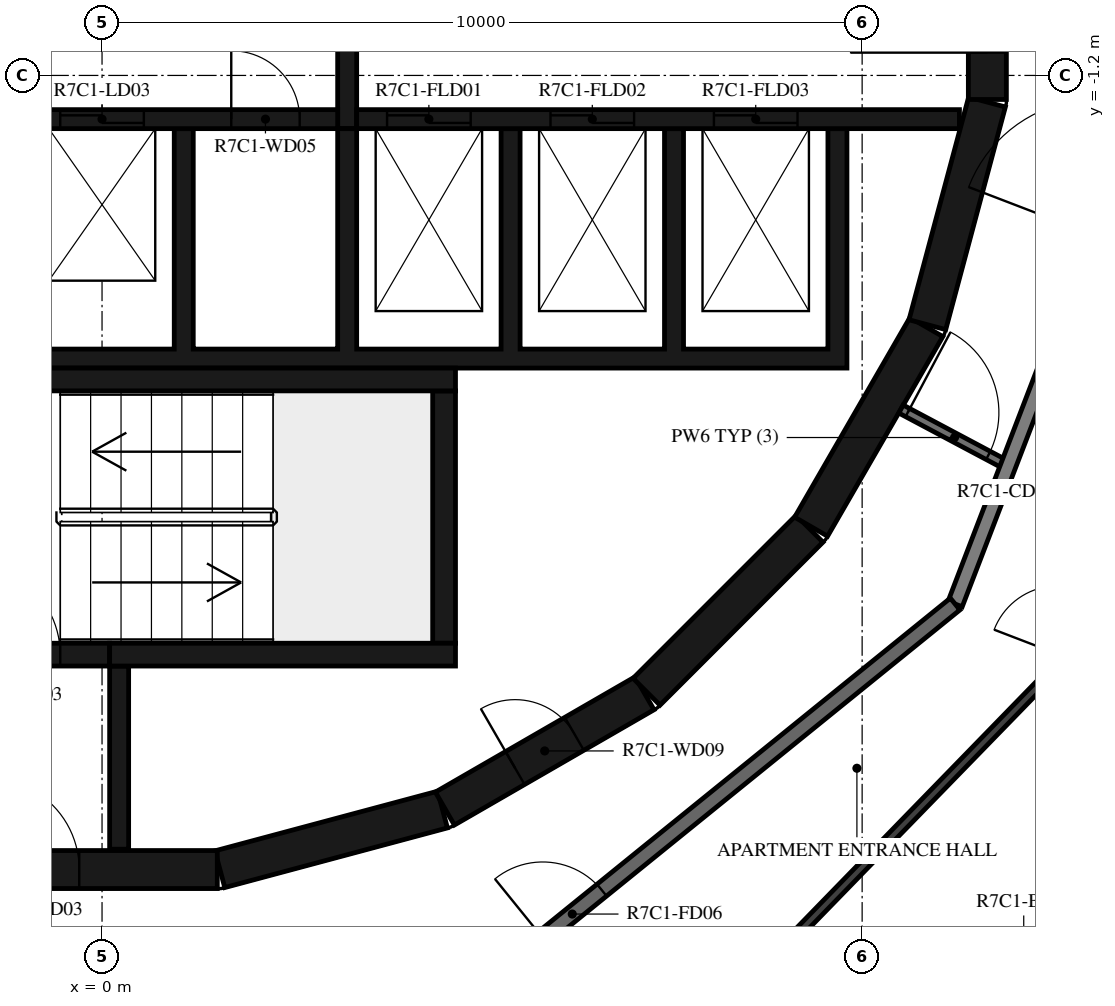
"""IFC4 building model, lengths in metres.
Left out: names, types, materials, properties, quantities, classifications, styles, units other than length and angle.
Written with IfcOpenShell. Run it as: python <this file> out.ifc"""

import sys

from ifc_helpers import new_model, si_unit, direction, frame, frame_2d, origin, place, context, subcontext, project, spatial, polyline, rectangle, outline, extrude, element, fill, save


model = new_model("IFC4")
c1 = context("Model", 3, precision=1e-05, world=origin(), true_north=direction((0.0, 1.0)))
c2 = subcontext(c1, "Body", "Model", "MODEL_VIEW")
j1 = project(units=[si_unit("LENGTHUNIT", "METRE"), si_unit("PLANEANGLEUNIT", "RADIAN")], contexts=[c1])
p1 = place(None, origin())
s1 = spatial("IfcSite", under=j1, at=p1, CompositionType="ELEMENT")
p2 = place(p1, origin())
s2 = spatial("IfcBuilding", under=s1, at=p2, CompositionType="ELEMENT")
p3 = place(p2, frame((0.0, 0.0, 287.9)))
s3 = spatial("IfcBuildingStorey", under=s2, at=p3, CompositionType="ELEMENT", Elevation=287.9)
p4 = place(p3, frame((1.55, -11.643, 0.0), z_axis=(0.0, 0.0, 1.0), x_axis=(0.965948410781, 0.258734743916, 0.0)))
e1 = element("IfcWall", 1, at=p4, inside=s3, PredefinedType="SHEAR", context=c2, shape_type="SweptSolid", body=[
    extrude(rectangle(XDim=3.033, YDim=0.5, at=frame_2d((1.516, 0.0))), origin(), (0.0, 0.0, 1.0), 3.05),
])
p5 = place(p3, frame((4.51, -10.845, 0.0), z_axis=(0.0, 0.0, 1.0), x_axis=(0.865975092491, 0.500087131594, 0.0)))
e2 = element("IfcWall", 2, at=p5, inside=s3, PredefinedType="SHEAR", context=c2, shape_type="SweptSolid", body=[
    extrude(rectangle(XDim=3.033, YDim=0.5, at=frame_2d((1.516, 0.0))), origin(), (0.0, 0.0, 1.0), 3.05),
])
p6 = place(p5, frame((1.066, 0.0, 0.0)))
e3 = element("IfcOpeningElement", 3, at=p6, cuts=e2, PredefinedType="OPENING", context=c2, shape_type="SweptSolid", body=[
    extrude(rectangle(XDim=0.9, YDim=2.1, at=frame_2d((0.45, 1.05))), frame((0.0, 0.26, 0.0), z_axis=(0.0, -1.0, 0.0), x_axis=(1.0, 0.0, 0.0)), (0.0, 0.0, 1.0), 0.52),
])
p7 = place(p3, frame((7.164, -9.308, 0.0), z_axis=(0.0, 0.0, 1.0), x_axis=(0.707106781187, 0.707106781187, 0.0)))
e4 = element("IfcWall", 4, at=p7, inside=s3, PredefinedType="SHEAR", context=c2, shape_type="SweptSolid", body=[
    extrude(rectangle(XDim=3.032, YDim=0.5, at=frame_2d((1.516, 0.0))), origin(), (0.0, 0.0, 1.0), 3.05),
])
for number, where, z_axis, x_axis in (
    (5, (9.329, -7.137, 0.0), (0.0, 0.0, 1.0), (0.5, 0.866, 0.0)),
    (6, (10.858, -4.479, 0.0), (0.0, 0.0, 1.0), (0.259, 0.966, 0.0)),
):
    element("IfcWall", number, at=place(p3, frame(where, z_axis=z_axis, x_axis=x_axis)), inside=s3, PredefinedType="SHEAR", context=c2, shape_type="SweptSolid", body=[
        extrude(rectangle(XDim=3.033, YDim=0.5, at=frame_2d((1.516, 0.0))), origin(), (0.0, 0.0, 1.0), 3.05),
    ])
p8 = place(p3, frame((11.647, -1.516, 0.0), z_axis=(0.0, 0.0, 1.0), x_axis=(0.0, 1.0, 0.0)))
e7 = element("IfcWall", 7, at=p8, inside=s3, PredefinedType="SHEAR", context=c2, shape_type="SweptSolid", body=[
    extrude(rectangle(XDim=3.033, YDim=0.5, at=frame_2d((1.516, 0.0))), origin(), (0.0, 0.0, 1.0), 3.05),
])
p9 = place(p8, frame((0.616, 0.0, 0.0)))
e8 = element("IfcOpeningElement", 8, at=p9, cuts=e7, PredefinedType="OPENING", context=c2, shape_type="SweptSolid", body=[
    extrude(rectangle(XDim=1.8, YDim=2.1, at=frame_2d((0.9, 1.05))), frame((0.0, 0.26, 0.0), z_axis=(0.0, -1.0, 0.0), x_axis=(1.0, 0.0, 0.0)), (0.0, 0.0, 1.0), 0.52),
])
p10 = place(p3, frame((-1.516, -11.647, 0.0), z_axis=(0.0, 0.0, 1.0), x_axis=(1.0, 0.0, 0.0)))
e9 = element("IfcWall", 9, at=p10, inside=s3, PredefinedType="SHEAR", context=c2, shape_type="SweptSolid", body=[
    extrude(rectangle(XDim=3.033, YDim=0.5, at=frame_2d((1.516, 0.0))), origin(), (0.0, 0.0, 1.0), 3.05),
])
p11 = place(p10, frame((0.016, 0.0, 0.0)))
e10 = element("IfcOpeningElement", 10, at=p11, cuts=e9, PredefinedType="OPENING", context=c2, shape_type="SweptSolid", body=[
    extrude(rectangle(XDim=1.2, YDim=2.1, at=frame_2d((0.6, 1.05))), frame((0.0, 0.26, 0.0), z_axis=(0.0, -1.0, 0.0), x_axis=(1.0, 0.0, 0.0)), (0.0, 0.0, 1.0), 0.52),
])
p12 = place(p3, frame((-2.4, -5.2, 0.0), z_axis=(0.0, 0.0, 1.0), x_axis=(1.0, 0.0, 0.0)))
e11 = element("IfcWall", 11, at=p12, inside=s3, PredefinedType="SHEAR", context=c2, shape_type="SweptSolid", body=[
    extrude(rectangle(XDim=7.05, YDim=0.3, at=frame_2d((3.525, 0.0))), origin(), (0.0, 0.0, 1.0), 3.05),
])
p13 = place(p3, frame((4.5, -8.67, 0.0), z_axis=(0.0, 0.0, 1.0), x_axis=(0.0, 1.0, 0.0)))
e12 = element("IfcWall", 12, at=p13, inside=s3, PredefinedType="SHEAR", context=c2, shape_type="SweptSolid", body=[
    extrude(rectangle(XDim=3.32, YDim=0.3, at=frame_2d((1.66, 0.0))), origin(), (0.0, 0.0, 1.0), 3.05),
])
p14 = place(p3, frame((0.1, -8.82, 0.0), z_axis=(0.0, 0.0, 1.0), x_axis=(1.0, 0.0, 0.0)))
e13 = element("IfcWall", 13, at=p14, inside=s3, PredefinedType="SHEAR", context=c2, shape_type="SweptSolid", body=[
    extrude(rectangle(XDim=4.55, YDim=0.3, at=frame_2d((2.275, 0.0))), origin(), (0.0, 0.0, 1.0), 3.05),
])
p15 = place(p3, frame((-2.4, -8.82, 0.0), z_axis=(0.0, 0.0, 1.0), x_axis=(1.0, 0.0, 0.0)))
e14 = element("IfcWall", 14, at=p15, inside=s3, PredefinedType="SHEAR", context=c2, shape_type="SweptSolid", body=[
    extrude(rectangle(XDim=2.5, YDim=0.3, at=frame_2d((1.25, 0.0))), origin(), (0.0, 0.0, 1.0), 3.05),
])
p16 = place(p15, frame((0.65, 0.0, 0.0)))
e15 = element("IfcOpeningElement", 15, at=p16, cuts=e14, PredefinedType="OPENING", context=c2, shape_type="SweptSolid", body=[
    extrude(rectangle(XDim=1.2, YDim=2.1, at=frame_2d((0.6, 1.05))), frame((0.0, 0.16, 0.0), z_axis=(0.0, -1.0, 0.0), x_axis=(1.0, 0.0, 0.0)), (0.0, 0.0, 1.0), 0.32),
])
p17 = place(p3, frame((0.225, -8.97, 0.0), z_axis=(0.0, 0.0, 1.0), x_axis=(0.0, -1.0, 0.0)))
e16 = element("IfcWall", 16, at=p17, inside=s3, PredefinedType="SHEAR", context=c2, shape_type="SweptSolid", body=[
    extrude(rectangle(XDim=2.41, YDim=0.25, at=frame_2d((1.205, 0.0))), origin(), (0.0, 0.0, 1.0), 3.05),
])
p18 = place(p3, origin())
e17 = element("IfcWall", 17, at=p18, inside=s3, PredefinedType="SHEAR", context=c2, shape_type="SweptSolid", body=[
    extrude(outline(polyline([(9.8, -5.05), (9.8, -4.8), (9.8, -1.9), (9.55, -1.9), (9.55, -4.8), (7.65, -4.8), (7.65, -1.9), (7.4, -1.9), (7.4, -4.8), (5.5, -4.8), (5.5, -1.9), (5.25, -1.9), (5.25, -4.8), (3.35, -4.8), (3.35, -1.9), (3.1, -1.9), (3.1, -4.8), (1.2, -4.8), (1.2, -1.9), (0.95, -1.9), (0.95, -4.8), (-0.95, -4.8), (-0.95, -1.9), (-1.2, -1.9), (-1.2, -4.8), (-3.1, -4.8), (-3.1, -1.9), (-3.35, -1.9), (-3.35, -4.8), (-5.25, -4.8), (-5.25, -1.9), (-5.5, -1.9), (-5.5, -4.8), (-9.55, -4.8), (-9.55, -1.9), (-9.8, -1.9), (-9.8, -4.8), (-9.8, -5.05), (9.8, -5.05)])), origin(), (0.0, 0.0, 1.0), 3.05),
])
p19 = place(p3, frame((-11.28, -1.775, 0.0), z_axis=(0.0, 0.0, 1.0), x_axis=(1.0, 0.0, 0.0)))
e18 = element("IfcWall", 18, at=p19, inside=s3, PredefinedType="SHEAR", context=c2, shape_type="SweptSolid", body=[
    extrude(rectangle(XDim=14.38, YDim=0.25, at=frame_2d((7.19, 0.0))), origin(), (0.0, 0.0, 1.0), 3.05),
])
p20 = place(p19, frame((6.43, 0.0, 0.0)))
e19 = element("IfcOpeningElement", 19, at=p20, cuts=e18, PredefinedType="OPENING", context=c2, shape_type="SweptSolid", body=[
    extrude(rectangle(XDim=1.1, YDim=2.1, at=frame_2d((0.55, 1.05))), frame((0.0, 0.135, 0.0), z_axis=(0.0, -1.0, 0.0), x_axis=(1.0, 0.0, 0.0)), (0.0, 0.0, 1.0), 0.27),
])
p21 = place(p19, frame((8.58, 0.0, 0.0)))
e20 = element("IfcOpeningElement", 20, at=p21, cuts=e18, PredefinedType="OPENING", context=c2, shape_type="SweptSolid", body=[
    extrude(rectangle(XDim=1.1, YDim=2.1, at=frame_2d((0.55, 1.05))), frame((0.0, 0.135, 0.0), z_axis=(0.0, -1.0, 0.0), x_axis=(1.0, 0.0, 0.0)), (0.0, 0.0, 1.0), 0.27),
])
p22 = place(p19, frame((10.73, 0.0, 0.0)))
e21 = element("IfcOpeningElement", 21, at=p22, cuts=e18, PredefinedType="OPENING", context=c2, shape_type="SweptSolid", body=[
    extrude(rectangle(XDim=1.1, YDim=2.1, at=frame_2d((0.55, 1.05))), frame((0.0, 0.135, 0.0), z_axis=(0.0, -1.0, 0.0), x_axis=(1.0, 0.0, 0.0)), (0.0, 0.0, 1.0), 0.27),
])
p23 = place(p19, frame((3.305, 0.0, 0.0)))
e22 = element("IfcOpeningElement", 22, at=p23, cuts=e18, PredefinedType="OPENING", context=c2, shape_type="SweptSolid", body=[
    extrude(rectangle(XDim=0.9, YDim=2.1, at=frame_2d((0.45, 1.05))), frame((0.0, 0.135, 0.0), z_axis=(0.0, -1.0, 0.0), x_axis=(1.0, 0.0, 0.0)), (0.0, 0.0, 1.0), 0.27),
])
p24 = place(p19, frame((12.98, 0.0, 0.0)))
e23 = element("IfcOpeningElement", 23, at=p24, cuts=e18, PredefinedType="OPENING", context=c2, shape_type="SweptSolid", body=[
    extrude(rectangle(XDim=0.9, YDim=2.1, at=frame_2d((0.45, 1.05))), frame((0.0, 0.135, 0.0), z_axis=(0.0, -1.0, 0.0), x_axis=(1.0, 0.0, 0.0)), (0.0, 0.0, 1.0), 0.27),
])
p25 = place(p3, frame((3.35, -1.775, 0.0), z_axis=(0.0, 0.0, 1.0), x_axis=(1.0, 0.0, 0.0)))
e24 = element("IfcWall", 24, at=p25, inside=s3, PredefinedType="SHEAR", context=c2, shape_type="SweptSolid", body=[
    extrude(rectangle(XDim=7.93, YDim=0.25, at=frame_2d((3.965, 0.0))), origin(), (0.0, 0.0, 1.0), 3.05),
])
p26 = place(p25, frame((0.4, 0.0, 0.0)))
e25 = element("IfcOpeningElement", 25, at=p26, cuts=e24, PredefinedType="OPENING", context=c2, shape_type="SweptSolid", body=[
    extrude(rectangle(XDim=1.1, YDim=2.4, at=frame_2d((0.55, 1.2))), frame((0.0, 0.135, 0.0), z_axis=(0.0, -1.0, 0.0), x_axis=(1.0, 0.0, 0.0)), (0.0, 0.0, 1.0), 0.27),
])
p27 = place(p25, frame((2.55, 0.0, 0.0)))
e26 = element("IfcOpeningElement", 26, at=p27, cuts=e24, PredefinedType="OPENING", context=c2, shape_type="SweptSolid", body=[
    extrude(rectangle(XDim=1.1, YDim=2.4, at=frame_2d((0.55, 1.2))), frame((0.0, 0.135, 0.0), z_axis=(0.0, -1.0, 0.0), x_axis=(1.0, 0.0, 0.0)), (0.0, 0.0, 1.0), 0.27),
])
p28 = place(p25, frame((4.7, 0.0, 0.0)))
e27 = element("IfcOpeningElement", 27, at=p28, cuts=e24, PredefinedType="OPENING", context=c2, shape_type="SweptSolid", body=[
    extrude(rectangle(XDim=1.1, YDim=2.4, at=frame_2d((0.55, 1.2))), frame((0.0, 0.135, 0.0), z_axis=(0.0, -1.0, 0.0), x_axis=(1.0, 0.0, 0.0)), (0.0, 0.0, 1.0), 0.27),
])
p29 = place(p3, frame((3.225, -1.9, 0.0), z_axis=(0.0, 0.0, 1.0), x_axis=(0.0, 1.0, 0.0)))
e28 = element("IfcWall", 28, at=p29, inside=s3, PredefinedType="SHEAR", context=c2, shape_type="SweptSolid", body=[
    extrude(rectangle(XDim=3.8, YDim=0.25, at=frame_2d((1.9, 0.0))), origin(), (0.0, 0.0, 1.0), 3.05),
])
p30 = place(p3, frame((10.511, -5.589, 0.0), z_axis=(0.0, 0.0, 1.0), x_axis=(0.882983002821, -0.469404960273, 0.0)))
e29 = element("IfcWall", 29, at=p30, inside=s3, PredefinedType="PARTITIONING", context=c2, shape_type="SweptSolid", body=[
    extrude(rectangle(XDim=1.596, YDim=0.12, at=frame_2d((0.798, 0.0))), origin(), (0.0, 0.0, 1.0), 3.05),
])
p31 = place(p30, frame((0.1, 0.0, 0.0)))
e30 = element("IfcOpeningElement", 30, at=p31, cuts=e29, PredefinedType="OPENING", context=c2, shape_type="SweptSolid", body=[
    extrude(rectangle(XDim=1.2, YDim=2.1, at=frame_2d((0.6, 1.05))), frame((0.0, 0.07, 0.0), z_axis=(0.0, -1.0, 0.0), x_axis=(1.0, 0.0, 0.0)), (0.0, 0.0, 1.0), 0.14),
])
p32 = place(p3, frame((11.223, -8.154, 0.0), z_axis=(0.0, 0.0, 1.0), x_axis=(0.358341090983, 0.93359073609, 0.0)))
e31 = element("IfcWall", 31, at=p32, inside=s3, PredefinedType="STANDARD", context=c2, shape_type="SweptSolid", body=[
    extrude(rectangle(XDim=7.181, YDim=0.2, at=frame_2d((3.59, 0.0))), origin(), (0.0, 0.0, 1.0), 3.05),
])
p33 = place(p32, frame((5.185, 0.0, 0.0)))
e32 = element("IfcOpeningElement", 32, at=p33, cuts=e31, PredefinedType="OPENING", context=c2, shape_type="SweptSolid", body=[
    extrude(rectangle(XDim=1.8, YDim=2.1, at=frame_2d((0.9, 1.05))), frame((0.0, 0.11, 0.0), z_axis=(0.0, -1.0, 0.0), x_axis=(1.0, 0.0, 0.0)), (0.0, 0.0, 1.0), 0.22),
])
p34 = place(p3, frame((5.643, -12.673, 0.0), z_axis=(0.0, 0.0, 1.0), x_axis=(0.777160148113, 0.629302871585, 0.0)))
e33 = element("IfcWall", 33, at=p34, inside=s3, PredefinedType="STANDARD", context=c2, shape_type="SweptSolid", body=[
    extrude(rectangle(XDim=7.181, YDim=0.2, at=frame_2d((3.59, 0.0))), origin(), (0.0, 0.0, 1.0), 3.05),
])
p35 = place(p34, frame((0.2, 0.0, 0.0)))
e34 = element("IfcOpeningElement", 34, at=p35, cuts=e33, PredefinedType="OPENING", context=c2, shape_type="SweptSolid", body=[
    extrude(rectangle(XDim=1.0, YDim=2.1, at=frame_2d((0.5, 1.05))), frame((0.0, 0.11, 0.0), z_axis=(0.0, -1.0, 0.0), x_axis=(1.0, 0.0, 0.0)), (0.0, 0.0, 1.0), 0.22),
])
p36 = place(p3, frame((7.007, -14.692, 0.0), z_axis=(0.0, 0.0, 1.0), x_axis=(0.697286714348, 0.716792325568, 0.0)))
e35 = element("IfcWall", 35, at=p36, inside=s3, PredefinedType="PARTITIONING", context=c2, shape_type="SweptSolid", body=[
    extrude(rectangle(XDim=7.848, YDim=0.12, at=frame_2d((3.924, 0.0))), origin(), (0.0, 0.0, 1.0), 3.05),
])
p37 = place(p36, frame((0.2, 0.0, 0.0)))
e36 = element("IfcOpeningElement", 36, at=p37, cuts=e35, PredefinedType="OPENING", context=c2, shape_type="SweptSolid", body=[
    extrude(rectangle(XDim=0.9, YDim=2.1, at=frame_2d((0.45, 1.05))), frame((0.0, 0.07, 0.0), z_axis=(0.0, -1.0, 0.0), x_axis=(1.0, 0.0, 0.0)), (0.0, 0.0, 1.0), 0.14),
])
p38 = place(p16, origin())
e37 = element("IfcDoor", 37, at=p38, inside=s3, OperationType="SINGLE_SWING_LEFT", PredefinedType="DOOR", context=c2, shape_type="SweptSolid", body=[
    extrude(rectangle(XDim=1.2, YDim=2.1, at=frame_2d((0.6, 1.05))), frame((0.0, 0.025, 0.0), z_axis=(0.0, -1.0, 0.0), x_axis=(1.0, 0.0, 0.0)), (0.0, 0.0, 1.0), 0.05),
])
fill(e15, e37)
p39 = place(p11, origin())
e38 = element("IfcDoor", 38, at=p39, inside=s3, OperationType="SINGLE_SWING_RIGHT", PredefinedType="DOOR", context=c2, shape_type="SweptSolid", body=[
    extrude(rectangle(XDim=1.2, YDim=2.1, at=frame_2d((0.6, 1.05))), frame((0.0, 0.025, 0.0), z_axis=(0.0, -1.0, 0.0), x_axis=(1.0, 0.0, 0.0)), (0.0, 0.0, 1.0), 0.05),
])
fill(e10, e38)
p40 = place(p9, origin())
e39 = element("IfcDoor", 39, at=p40, inside=s3, OperationType="DOUBLE_DOOR_SINGLE_SWING", PredefinedType="DOOR", context=c2, shape_type="SweptSolid", body=[
    extrude(rectangle(XDim=1.8, YDim=2.1, at=frame_2d((0.9, 1.05))), frame((0.0, 0.025, 0.0), z_axis=(0.0, -1.0, 0.0), x_axis=(1.0, 0.0, 0.0)), (0.0, 0.0, 1.0), 0.05),
])
fill(e8, e39)
p41 = place(p22, origin())
e40 = element("IfcDoor", 40, at=p41, inside=s3, OperationType="DOUBLE_DOOR_SLIDING", PredefinedType="DOOR", context=c2, shape_type="SweptSolid", body=[
    extrude(rectangle(XDim=1.1, YDim=2.1, at=frame_2d((0.55, 1.05))), frame((0.0, 0.025, 0.0), z_axis=(0.0, -1.0, 0.0), x_axis=(1.0, 0.0, 0.0)), (0.0, 0.0, 1.0), 0.05),
])
fill(e21, e40)
p42 = place(p26, origin())
e41 = element("IfcDoor", 41, at=p42, inside=s3, OperationType="DOUBLE_DOOR_SLIDING", PredefinedType="DOOR", context=c2, shape_type="SweptSolid", body=[
    extrude(rectangle(XDim=1.1, YDim=2.4, at=frame_2d((0.55, 1.2))), frame((0.0, 0.025, 0.0), z_axis=(0.0, -1.0, 0.0), x_axis=(1.0, 0.0, 0.0)), (0.0, 0.0, 1.0), 0.05),
])
fill(e25, e41)
p43 = place(p27, origin())
e42 = element("IfcDoor", 42, at=p43, inside=s3, OperationType="DOUBLE_DOOR_SLIDING", PredefinedType="DOOR", context=c2, shape_type="SweptSolid", body=[
    extrude(rectangle(XDim=1.1, YDim=2.4, at=frame_2d((0.55, 1.2))), frame((0.0, 0.025, 0.0), z_axis=(0.0, -1.0, 0.0), x_axis=(1.0, 0.0, 0.0)), (0.0, 0.0, 1.0), 0.05),
])
fill(e26, e42)
p44 = place(p28, origin())
e43 = element("IfcDoor", 43, at=p44, inside=s3, OperationType="DOUBLE_DOOR_SLIDING", PredefinedType="DOOR", context=c2, shape_type="SweptSolid", body=[
    extrude(rectangle(XDim=1.1, YDim=2.4, at=frame_2d((0.55, 1.2))), frame((0.0, 0.025, 0.0), z_axis=(0.0, -1.0, 0.0), x_axis=(1.0, 0.0, 0.0)), (0.0, 0.0, 1.0), 0.05),
])
fill(e27, e43)
p45 = place(p24, origin())
e44 = element("IfcDoor", 44, at=p45, inside=s3, OperationType="SINGLE_SWING_LEFT", PredefinedType="DOOR", context=c2, shape_type="SweptSolid", body=[
    extrude(rectangle(XDim=0.9, YDim=2.1, at=frame_2d((0.45, 1.05))), frame((0.0, 0.025, 0.0), z_axis=(0.0, -1.0, 0.0), x_axis=(1.0, 0.0, 0.0)), (0.0, 0.0, 1.0), 0.05),
])
fill(e23, e44)
p46 = place(p6, origin())
e45 = element("IfcDoor", 45, at=p46, inside=s3, OperationType="SINGLE_SWING_LEFT", PredefinedType="DOOR", context=c2, shape_type="SweptSolid", body=[
    extrude(rectangle(XDim=0.9, YDim=2.1, at=frame_2d((0.45, 1.05))), frame((0.0, 0.025, 0.0), z_axis=(0.0, -1.0, 0.0), x_axis=(1.0, 0.0, 0.0)), (0.0, 0.0, 1.0), 0.05),
])
fill(e3, e45)
p47 = place(p35, origin())
e46 = element("IfcDoor", 46, at=p47, inside=s3, OperationType="SINGLE_SWING_LEFT", PredefinedType="DOOR", context=c2, shape_type="SweptSolid", body=[
    extrude(rectangle(XDim=1.0, YDim=2.1, at=frame_2d((0.5, 1.05))), frame((0.0, 0.025, 0.0), z_axis=(0.0, -1.0, 0.0), x_axis=(1.0, 0.0, 0.0)), (0.0, 0.0, 1.0), 0.05),
])
fill(e34, e46)
p48 = place(p31, origin())
e47 = element("IfcDoor", 47, at=p48, inside=s3, OperationType="DOUBLE_DOOR_SINGLE_SWING", PredefinedType="DOOR", context=c2, shape_type="SweptSolid", body=[
    extrude(rectangle(XDim=1.2, YDim=2.1, at=frame_2d((0.6, 1.05))), frame((0.0, 0.025, 0.0), z_axis=(0.0, -1.0, 0.0), x_axis=(1.0, 0.0, 0.0)), (0.0, 0.0, 1.0), 0.05),
])
fill(e30, e47)
save(model, sys.argv[1])
